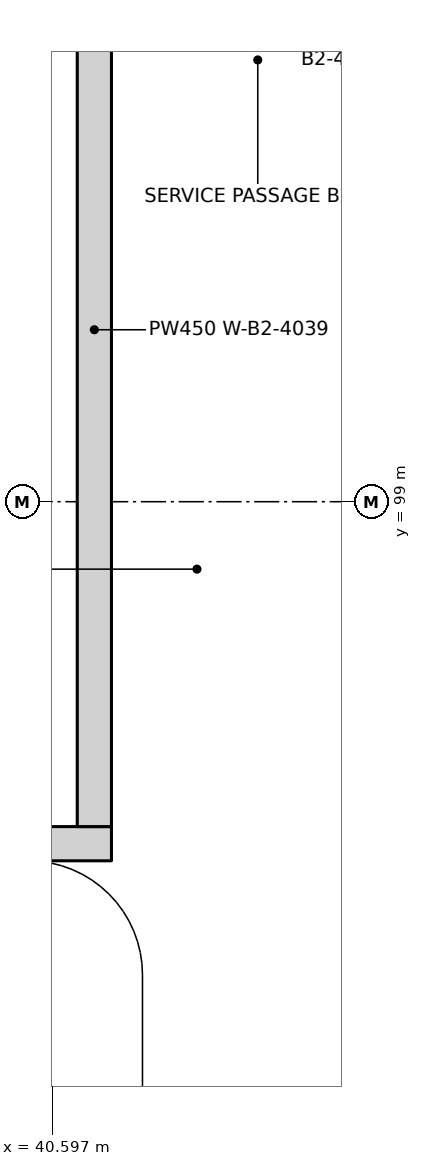
"""IFC4 building model, lengths in metres.
Left out: names, types, materials, properties, quantities, classifications, styles, units other than length and angle.
Written with IfcOpenShell. Run it as: python <this file> out.ifc"""

import sys

from ifc_helpers import new_model, si_unit, direction, frame, frame_2d, origin, place, context, subcontext, project, spatial, rectangle, extrude, element, save


model = new_model("IFC4")
c1 = context("Model", 3, precision=1e-05, world=origin(), true_north=direction((0.0, 1.0)))
c2 = subcontext(c1, "Body", "Model", "MODEL_VIEW")
j1 = project(units=[si_unit("LENGTHUNIT", "METRE"), si_unit("PLANEANGLEUNIT", "RADIAN")], contexts=[c1])
p1 = place(None, origin())
s1 = spatial("IfcSite", under=j1, at=p1, CompositionType="ELEMENT")
p2 = place(p1, origin())
s2 = spatial("IfcBuilding", under=s1, at=p2, CompositionType="ELEMENT")
p3 = place(p2, frame((0.0, 0.0, -9.9)))
s3 = spatial("IfcBuildingStorey", under=s2, at=p3, CompositionType="ELEMENT", Elevation=-9.9)
p4 = place(p3, frame((8.125, 94.5, 0.0), z_axis=(0.0, 0.0, 1.0), x_axis=(1.0, 0.0, 0.0)))
e1 = element("IfcWall", 1, at=p4, inside=s3, PredefinedType="SOLIDWALL", context=c2, shape_type="SweptSolid", body=[
    extrude(rectangle(XDim=33.25, YDim=0.45, at=frame_2d((16.625, 0.0))), origin(), (0.0, 0.0, 1.0), 4.5),
])
p5 = place(p4, frame((7.625, 0.0, 0.0)))
e2 = element("IfcOpeningElement", 2, at=p5, cuts=e1, PredefinedType="OPENING", context=c2, shape_type="SweptSolid", body=[
    extrude(rectangle(XDim=1.6, YDim=2.1, at=frame_2d((0.8, 1.05))), frame((0.0, 0.235, 0.0), z_axis=(0.0, -1.0, 0.0), x_axis=(1.0, 0.0, 0.0)), (0.0, 0.0, 1.0), 0.47),
])
p6 = place(p4, frame((29.825, 0.0, 0.0)))
e3 = element("IfcOpeningElement", 3, at=p6, cuts=e1, PredefinedType="OPENING", context=c2, shape_type="SweptSolid", body=[
    extrude(rectangle(XDim=2.0, YDim=2.4, at=frame_2d((1.0, 1.2))), frame((0.0, 0.235, 0.0), z_axis=(0.0, -1.0, 0.0), x_axis=(1.0, 0.0, 0.0)), (0.0, 0.0, 1.0), 0.47),
])
p7 = place(p3, frame((41.15, 94.725, 0.0), z_axis=(0.0, 0.0, 1.0), x_axis=(0.0, 1.0, 0.0)))
e4 = element("IfcWall", 4, at=p7, inside=s3, PredefinedType="SOLIDWALL", context=c2, shape_type="SweptSolid", body=[
    extrude(rectangle(XDim=13.075, YDim=0.45, at=frame_2d((6.538, 0.0))), origin(), (0.0, 0.0, 1.0), 4.5),
])
save(model, sys.argv[1])
